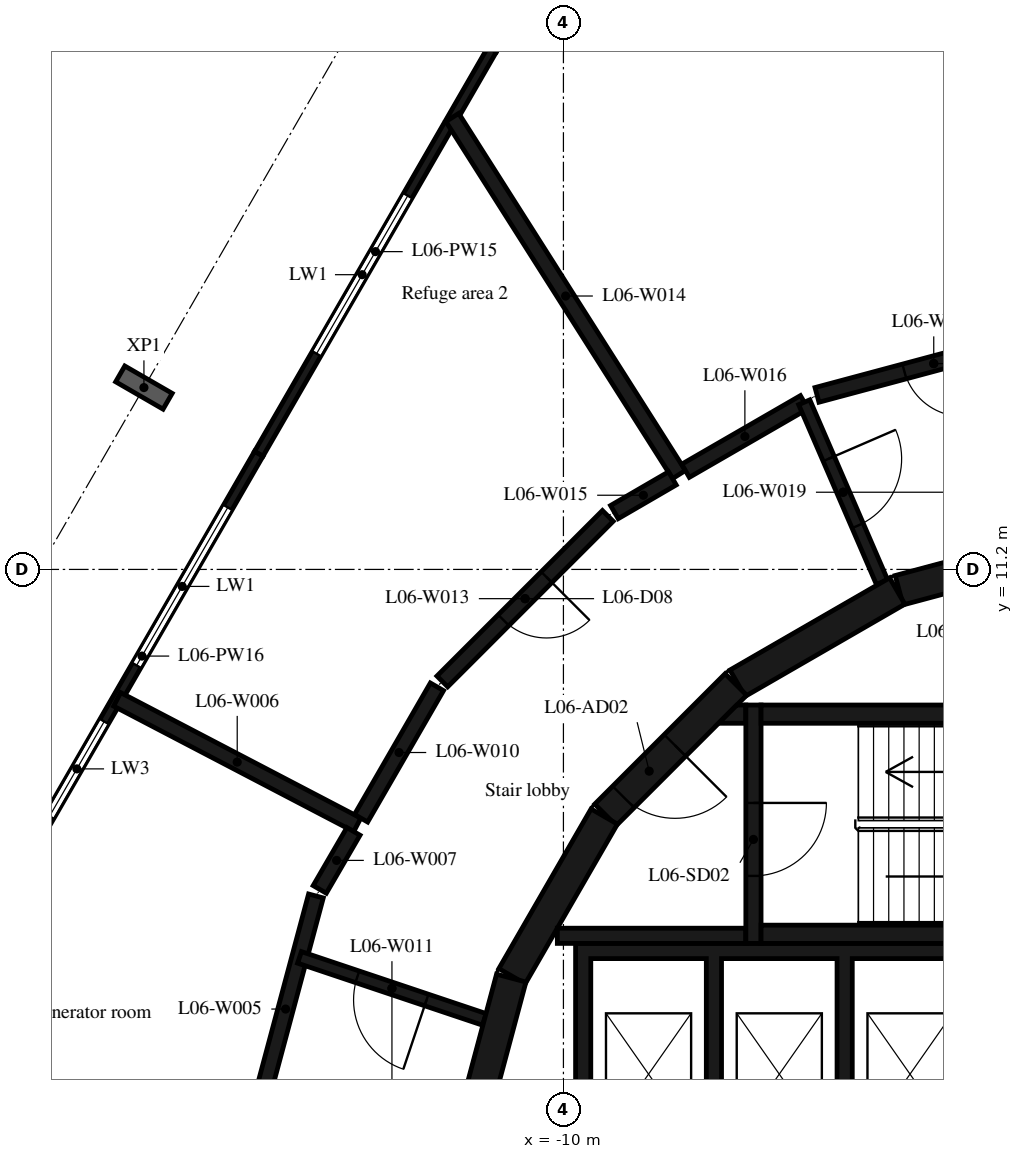
"""IFC4 building model, lengths in metres.
Left out: names, types, materials, properties, quantities, classifications, styles, units other than length and angle.
Written with IfcOpenShell. Run it as: python <this file> out.ifc"""

import sys

from ifc_helpers import new_model, si_unit, direction, frame, frame_2d, origin, origin_2d, place, context, subcontext, project, spatial, polyline, rectangle, i_section, outline, extrude, element, fill, save


model = new_model("IFC4")
c1 = context("Model", 3, precision=1e-05, world=origin(), true_north=direction((0.0, 1.0)))
c2 = subcontext(c1, "Body", "Model", "MODEL_VIEW")
j1 = project(units=[si_unit("LENGTHUNIT", "METRE"), si_unit("PLANEANGLEUNIT", "RADIAN")], contexts=[c1])
p1 = place(None, origin())
s1 = spatial("IfcSite", under=j1, at=p1, CompositionType="ELEMENT")
p2 = place(p1, origin())
s2 = spatial("IfcBuilding", under=s1, at=p2, CompositionType="ELEMENT")
p3 = place(p2, frame((0.0, 0.0, 33.0)))
s3 = spatial("IfcBuildingStorey", under=s2, at=p3, CompositionType="ELEMENT", Elevation=33.0)
p4 = place(p3, frame((-16.899, 14.19, -0.45), z_axis=(0.0, 0.0, 1.0), x_axis=(0.50000017485, 0.866025302835, 0.0)))
e1 = element("IfcColumn", 1, at=p4, inside=s3, PredefinedType="COLUMN", context=c2, shape_type="SweptSolid", body=[
    extrude(i_section(OverallWidth=0.3, OverallDepth=0.9, WebThickness=0.019, FlangeThickness=0.035, FilletRadius=0.03, at=origin_2d()), origin(), (0.0, 0.0, 1.0), 5.4),
])
p5 = place(p3, frame((-11.171, 19.752, 0.0), z_axis=(0.0, 0.0, 1.0), x_axis=(-0.500005879718, -0.866022009101, 0.0)))
e2 = element("IfcWall", 2, at=p5, inside=s3, PredefinedType="STANDARD", context=c2, shape_type="SweptSolid", body=[
    extrude(rectangle(XDim=7.68, YDim=0.16, at=frame_2d((3.84, 0.0))), origin(), (0.0, 0.0, 1.0), 4.95),
])
p6 = place(p5, frame((2.778, 0.0, 1.0)))
e3 = element("IfcOpeningElement", 3, at=p6, cuts=e2, PredefinedType="OPENING", context=c2, shape_type="SweptSolid", body=[
    extrude(rectangle(XDim=3.0, YDim=2.2, at=frame_2d((1.5, 1.1))), frame((0.0, 0.09, 0.0), z_axis=(0.0, -1.0, 0.0), x_axis=(1.0, 0.0, 0.0)), (0.0, 0.0, 1.0), 0.18),
])
p7 = place(p3, frame((-15.011, 13.101, 0.0), z_axis=(0.0, 0.0, 1.0), x_axis=(-0.500005879718, -0.866022009101, 0.0)))
e4 = element("IfcWall", 4, at=p7, inside=s3, PredefinedType="STANDARD", context=c2, shape_type="SweptSolid", body=[
    extrude(rectangle(XDim=7.68, YDim=0.16, at=frame_2d((3.84, 0.0))), origin(), (0.0, 0.0, 1.0), 4.95),
])
p8 = place(p7, frame((1.017, 0.0, 1.0)))
e5 = element("IfcOpeningElement", 5, at=p8, cuts=e4, PredefinedType="OPENING", context=c2, shape_type="SweptSolid", body=[
    extrude(rectangle(XDim=3.0, YDim=2.2, at=frame_2d((1.5, 1.1))), frame((0.0, 0.09, 0.0), z_axis=(0.0, -1.0, 0.0), x_axis=(1.0, 0.0, 0.0)), (0.0, 0.0, 1.0), 0.18),
])
p9 = place(p7, frame((5.082, 0.0, 1.0)))
e6 = element("IfcOpeningElement", 6, at=p9, cuts=e4, PredefinedType="OPENING", context=c2, shape_type="SweptSolid", body=[
    extrude(rectangle(XDim=1.8, YDim=2.2, at=frame_2d((0.9, 1.1))), frame((0.0, 0.09, 0.0), z_axis=(0.0, -1.0, 0.0), x_axis=(1.0, 0.0, 0.0)), (0.0, 0.0, 1.0), 0.18),
])
for number, where, z_axis, x_axis in (
    (7, (-1.55, 11.643, 0.0), (0.0, 0.0, 1.0), (-0.966, -0.259, 0.0)),
    (8, (-4.51, 10.845, 0.0), (0.0, 0.0, 1.0), (-0.866, -0.5, 0.0)),
):
    element("IfcWall", number, at=place(p3, frame(where, z_axis=z_axis, x_axis=x_axis)), inside=s3, PredefinedType="SHEAR", context=c2, shape_type="SweptSolid", body=[
        extrude(rectangle(XDim=3.033, YDim=0.5, at=frame_2d((1.516, 0.0))), origin(), (0.0, 0.0, 1.0), 4.95),
    ])
p10 = place(p3, frame((-7.164, 9.308, 0.0), z_axis=(0.0, 0.0, 1.0), x_axis=(-0.707106781187, -0.707106781187, 0.0)))
e9 = element("IfcWall", 9, at=p10, inside=s3, PredefinedType="SHEAR", context=c2, shape_type="SweptSolid", body=[
    extrude(rectangle(XDim=3.032, YDim=0.5, at=frame_2d((1.516, 0.0))), origin(), (0.0, 0.0, 1.0), 4.95),
])
p11 = place(p10, frame((1.416, 0.0, 0.0)))
e10 = element("IfcOpeningElement", 10, at=p11, cuts=e9, PredefinedType="OPENING", context=c2, shape_type="SweptSolid", body=[
    extrude(rectangle(XDim=1.2, YDim=2.1, at=frame_2d((0.6, 1.05))), frame((0.0, 0.26, 0.0), z_axis=(0.0, -1.0, 0.0), x_axis=(1.0, 0.0, 0.0)), (0.0, 0.0, 1.0), 0.52),
])
for number, where, z_axis, x_axis in (
    (11, (-9.329, 7.137, 0.0), (0.0, 0.0, 1.0), (-0.5, -0.866, 0.0)),
    (12, (-10.858, 4.479, 0.0), (0.0, 0.0, 1.0), (-0.259, -0.966, 0.0)),
):
    element("IfcWall", number, at=place(p3, frame(where, z_axis=z_axis, x_axis=x_axis)), inside=s3, PredefinedType="SHEAR", context=c2, shape_type="SweptSolid", body=[
        extrude(rectangle(XDim=3.033, YDim=0.5, at=frame_2d((1.516, 0.0))), origin(), (0.0, 0.0, 1.0), 4.95),
    ])
for number, where, z_axis, x_axis in (
    (13, (-6.75, 5.2, 0.0), (0.0, 0.0, 1.0), (1.0, 0.0, 0.0)),
    (14, (-6.75, 8.82, 0.0), (0.0, 0.0, 1.0), (1.0, 0.0, 0.0)),
):
    element("IfcWall", number, at=place(p3, frame(where, z_axis=z_axis, x_axis=x_axis)), inside=s3, PredefinedType="SHEAR", context=c2, shape_type="SweptSolid", body=[
        extrude(rectangle(XDim=6.75, YDim=0.3, at=frame_2d((3.375, 0.0))), origin(), (0.0, 0.0, 1.0), 4.95),
    ])
p12 = place(p3, frame((-6.875, 8.97, 0.0), z_axis=(0.0, 0.0, 1.0), x_axis=(0.0, -1.0, 0.0)))
e15 = element("IfcWall", 15, at=p12, inside=s3, PredefinedType="SHEAR", context=c2, shape_type="SweptSolid", body=[
    extrude(rectangle(XDim=3.92, YDim=0.25, at=frame_2d((1.96, 0.0))), origin(), (0.0, 0.0, 1.0), 4.95),
])
p13 = place(p12, frame((1.61, 0.0, 0.0)))
e16 = element("IfcOpeningElement", 16, at=p13, cuts=e15, PredefinedType="OPENING", context=c2, shape_type="SweptSolid", body=[
    extrude(rectangle(XDim=1.2, YDim=2.1, at=frame_2d((0.6, 1.05))), frame((0.0, 0.135, 0.0), z_axis=(0.0, -1.0, 0.0), x_axis=(1.0, 0.0, 0.0)), (0.0, 0.0, 1.0), 0.27),
])
p14 = place(p3, frame((-7.0, 5.175, 0.0), z_axis=(0.0, 0.0, 1.0), x_axis=(-1.0, 0.0, 0.0)))
e17 = element("IfcWall", 17, at=p14, inside=s3, PredefinedType="SHEAR", context=c2, shape_type="SweptSolid", body=[
    extrude(rectangle(XDim=3.1, YDim=0.25, at=frame_2d((1.55, 0.0))), origin(), (0.0, 0.0, 1.0), 4.95),
])
p15 = place(p3, origin())
e18 = element("IfcWall", 18, at=p15, inside=s3, PredefinedType="SHEAR", context=c2, shape_type="SweptSolid", body=[
    extrude(outline(polyline([(-7.148, 8.97), (-7.0, 8.97), (-7.0, 8.67), (-7.448, 8.67), (-7.148, 8.97)])), origin(), (0.0, 0.0, 1.0), 4.95),
])
p16 = place(p3, origin())
e19 = element("IfcWall", 19, at=p16, inside=s3, PredefinedType="SHEAR", context=c2, shape_type="SweptSolid", body=[
    extrude(outline(polyline([(-9.55, 4.8), (-7.65, 4.8), (-7.65, 1.9), (-7.4, 1.9), (-7.4, 4.8), (-5.5, 4.8), (-5.5, 1.9), (-5.25, 1.9), (-5.25, 4.8), (-3.35, 4.8), (-3.35, 1.9), (-3.1, 1.9), (-3.1, 4.8), (-1.2, 4.8), (-1.2, 1.9), (-0.95, 1.9), (-0.95, 4.8), (3.1, 4.8), (3.1, 1.9), (3.35, 1.9), (3.35, 4.8), (5.25, 4.8), (5.25, 1.9), (5.5, 1.9), (5.5, 4.8), (7.4, 4.8), (7.4, 1.9), (7.65, 1.9), (7.65, 4.8), (9.55, 4.8), (9.55, 1.9), (9.8, 1.9), (9.8, 4.8), (9.8, 5.05), (-9.8, 5.05), (-9.8, 4.8), (-9.8, 1.9), (-9.55, 1.9), (-9.55, 4.8)])), origin(), (0.0, 0.0, 1.0), 4.95),
])
p17 = place(p3, frame((-14.07, 5.83, 0.0), z_axis=(0.0, 0.0, 1.0), x_axis=(-0.259059323171, -0.965861411942, 0.0)))
e20 = element("IfcWall", 20, at=p17, inside=s3, PredefinedType="PARTITIONING", context=c2, shape_type="SweptSolid", body=[
    extrude(rectangle(XDim=3.851, YDim=0.25, at=frame_2d((1.925, 0.0))), origin(), (0.0, 0.0, 1.0), 4.95),
])
p18 = place(p3, frame((-13.39, 7.0, 0.0), z_axis=(0.0, 0.0, 1.0), x_axis=(-0.886352204499, 0.46301163007, 0.0)))
e21 = element("IfcWall", 21, at=p18, inside=s3, PredefinedType="PARTITIONING", context=c2, shape_type="SweptSolid", body=[
    extrude(rectangle(XDim=4.456, YDim=0.25, at=frame_2d((2.228, 0.0))), origin(), (0.0, 0.0, 1.0), 4.95),
])
p19 = place(p3, frame((-13.453, 6.892, 0.0), z_axis=(0.0, 0.0, 1.0), x_axis=(-0.502370413152, -0.864652512857, 0.0)))
e22 = element("IfcWall", 22, at=p19, inside=s3, PredefinedType="PARTITIONING", context=c2, shape_type="SweptSolid", body=[
    extrude(rectangle(XDim=1.103, YDim=0.25, at=frame_2d((0.552, 0.0))), origin(), (0.0, 0.0, 1.0), 4.95),
])
p20 = place(p3, frame((-12.08, 9.27, 0.0), z_axis=(0.0, 0.0, 1.0), x_axis=(-0.499821239653, -0.866128586522, 0.0)))
e23 = element("IfcWall", 23, at=p20, inside=s3, PredefinedType="PARTITIONING", context=c2, shape_type="SweptSolid", body=[
    extrude(rectangle(XDim=2.496, YDim=0.25, at=frame_2d((1.248, 0.0))), origin(), (0.0, 0.0, 1.0), 4.95),
])
p21 = place(p3, frame((-11.3, 3.8, 0.0), z_axis=(0.0, 0.0, 1.0), x_axis=(-0.94805712629, 0.318100118345, 0.0)))
e24 = element("IfcWall", 24, at=p21, inside=s3, PredefinedType="PARTITIONING", context=c2, shape_type="SweptSolid", body=[
    extrude(rectangle(XDim=3.207, YDim=0.2, at=frame_2d((1.603, 0.0))), origin(), (0.0, 0.0, 1.0), 4.95),
])
p22 = place(p21, frame((1.003, 0.0, 0.0)))
e25 = element("IfcOpeningElement", 25, at=p22, cuts=e24, PredefinedType="OPENING", context=c2, shape_type="SweptSolid", body=[
    extrude(rectangle(XDim=1.2, YDim=2.1, at=frame_2d((0.6, 1.05))), frame((0.0, 0.11, 0.0), z_axis=(0.0, -1.0, 0.0), x_axis=(1.0, 0.0, 0.0)), (0.0, 0.0, 1.0), 0.22),
])
p23 = place(p3, frame((-9.27, 12.08, 0.0), z_axis=(0.0, 0.0, 1.0), x_axis=(-0.707106781187, -0.707106781187, 0.0)))
e26 = element("IfcWall", 26, at=p23, inside=s3, PredefinedType="PARTITIONING", context=c2, shape_type="SweptSolid", body=[
    extrude(rectangle(XDim=3.849, YDim=0.25, at=frame_2d((1.925, 0.0))), origin(), (0.0, 0.0, 1.0), 4.95),
])
p24 = place(p23, frame((1.425, 0.0, 0.0)))
e27 = element("IfcOpeningElement", 27, at=p24, cuts=e26, PredefinedType="OPENING", context=c2, shape_type="SweptSolid", body=[
    extrude(rectangle(XDim=1.0, YDim=2.1, at=frame_2d((0.5, 1.05))), frame((0.0, 0.135, 0.0), z_axis=(0.0, -1.0, 0.0), x_axis=(1.0, 0.0, 0.0)), (0.0, 0.0, 1.0), 0.27),
])
p25 = place(p3, frame((-8.1, 12.76, 0.0), z_axis=(0.0, 0.0, 1.0), x_axis=(-0.535848500159, 0.844314150585, 0.0)))
e28 = element("IfcWall", 28, at=p25, inside=s3, PredefinedType="PARTITIONING", context=c2, shape_type="SweptSolid", body=[
    extrude(rectangle(XDim=6.955, YDim=0.25, at=frame_2d((3.478, 0.0))), origin(), (0.0, 0.0, 1.0), 4.95),
])
p26 = place(p3, frame((-8.208, 12.697, 0.0), z_axis=(0.0, 0.0, 1.0), x_axis=(-0.86455637663, -0.502535841138, 0.0)))
e29 = element("IfcWall", 29, at=p26, inside=s3, PredefinedType="PARTITIONING", context=c2, shape_type="SweptSolid", body=[
    extrude(rectangle(XDim=1.103, YDim=0.25, at=frame_2d((0.552, 0.0))), origin(), (0.0, 0.0, 1.0), 4.95),
])
p27 = place(p3, frame((-7.992, 12.823, 0.0), z_axis=(0.0, 0.0, 1.0), x_axis=(0.865900522319, 0.500216238688, 0.0)))
e30 = element("IfcWall", 30, at=p27, inside=s3, PredefinedType="PARTITIONING", context=c2, shape_type="SweptSolid", body=[
    extrude(rectangle(XDim=2.254, YDim=0.25, at=frame_2d((1.127, 0.0))), origin(), (0.0, 0.0, 1.0), 4.95),
])
p28 = place(p3, frame((-6.04, 13.949, 0.0), z_axis=(0.0, 0.0, 1.0), x_axis=(0.396905977672, -0.917859272922, 0.0)))
e31 = element("IfcWall", 31, at=p28, inside=s3, PredefinedType="PARTITIONING", context=c2, shape_type="SweptSolid", body=[
    extrude(rectangle(XDim=3.224, YDim=0.2, at=frame_2d((1.612, 0.0))), origin(), (0.0, 0.0, 1.0), 4.95),
])
p29 = place(p28, frame((1.012, 0.0, 0.0)))
e32 = element("IfcOpeningElement", 32, at=p29, cuts=e31, PredefinedType="OPENING", context=c2, shape_type="SweptSolid", body=[
    extrude(rectangle(XDim=1.2, YDim=2.1, at=frame_2d((0.6, 1.05))), frame((0.0, 0.11, 0.0), z_axis=(0.0, -1.0, 0.0), x_axis=(1.0, 0.0, 0.0)), (0.0, 0.0, 1.0), 0.22),
])
p30 = place(p3, frame((-1.99, 15.1, 0.0), z_axis=(0.0, 0.0, 1.0), x_axis=(-0.965857829358, -0.259072679895, 0.0)))
e33 = element("IfcWall", 33, at=p30, inside=s3, PredefinedType="PARTITIONING", context=c2, shape_type="SweptSolid", body=[
    extrude(rectangle(XDim=3.976, YDim=0.25, at=frame_2d((1.988, 0.0))), origin(), (0.0, 0.0, 1.0), 4.95),
])
p31 = place(p30, frame((1.488, 0.0, 0.0)))
e34 = element("IfcOpeningElement", 34, at=p31, cuts=e33, PredefinedType="OPENING", context=c2, shape_type="SweptSolid", body=[
    extrude(rectangle(XDim=1.0, YDim=2.1, at=frame_2d((0.5, 1.05))), frame((0.0, 0.135, 0.0), z_axis=(0.0, -1.0, 0.0), x_axis=(1.0, 0.0, 0.0)), (0.0, 0.0, 1.0), 0.27),
])
p32 = place(p6, origin())
e35 = element("IfcWindow", 35, at=p32, inside=s3, PartitioningType="SINGLE_PANEL", PredefinedType="WINDOW", context=c2, shape_type="SweptSolid", body=[
    extrude(rectangle(XDim=3.0, YDim=2.2, at=frame_2d((1.5, 1.1))), frame((0.0, 0.03, 0.0), z_axis=(0.0, -1.0, 0.0), x_axis=(1.0, 0.0, 0.0)), (0.0, 0.0, 1.0), 0.06),
])
fill(e3, e35)
p33 = place(p8, origin())
e36 = element("IfcWindow", 36, at=p33, inside=s3, PartitioningType="SINGLE_PANEL", PredefinedType="WINDOW", context=c2, shape_type="SweptSolid", body=[
    extrude(rectangle(XDim=3.0, YDim=2.2, at=frame_2d((1.5, 1.1))), frame((0.0, 0.03, 0.0), z_axis=(0.0, -1.0, 0.0), x_axis=(1.0, 0.0, 0.0)), (0.0, 0.0, 1.0), 0.06),
])
fill(e5, e36)
p34 = place(p9, origin())
e37 = element("IfcWindow", 37, at=p34, inside=s3, PartitioningType="SINGLE_PANEL", PredefinedType="WINDOW", context=c2, shape_type="SweptSolid", body=[
    extrude(rectangle(XDim=1.8, YDim=2.2, at=frame_2d((0.9, 1.1))), frame((0.0, 0.03, 0.0), z_axis=(0.0, -1.0, 0.0), x_axis=(1.0, 0.0, 0.0)), (0.0, 0.0, 1.0), 0.06),
])
fill(e6, e37)
p35 = place(p13, origin())
e38 = element("IfcDoor", 38, at=p35, inside=s3, OperationType="SINGLE_SWING_LEFT", PredefinedType="DOOR", context=c2, shape_type="SweptSolid", body=[
    extrude(rectangle(XDim=1.2, YDim=2.1, at=frame_2d((0.6, 1.05))), frame((0.0, 0.025, 0.0), z_axis=(0.0, -1.0, 0.0), x_axis=(1.0, 0.0, 0.0)), (0.0, 0.0, 1.0), 0.05),
])
fill(e16, e38)
p36 = place(p11, origin())
e39 = element("IfcDoor", 39, at=p36, inside=s3, OperationType="SINGLE_SWING_RIGHT", PredefinedType="DOOR", context=c2, shape_type="SweptSolid", body=[
    extrude(rectangle(XDim=1.2, YDim=2.1, at=frame_2d((0.6, 1.05))), frame((0.0, 0.025, 0.0), z_axis=(0.0, -1.0, 0.0), x_axis=(1.0, 0.0, 0.0)), (0.0, 0.0, 1.0), 0.05),
])
fill(e10, e39)
p37 = place(p24, origin())
e40 = element("IfcDoor", 40, at=p37, inside=s3, OperationType="SINGLE_SWING_LEFT", PredefinedType="DOOR", context=c2, shape_type="SweptSolid", body=[
    extrude(rectangle(XDim=1.0, YDim=2.1, at=frame_2d((0.5, 1.05))), frame((0.0, 0.025, 0.0), z_axis=(0.0, -1.0, 0.0), x_axis=(1.0, 0.0, 0.0)), (0.0, 0.0, 1.0), 0.05),
])
fill(e27, e40)
p38 = place(p31, origin())
e41 = element("IfcDoor", 41, at=p38, inside=s3, OperationType="SINGLE_SWING_LEFT", PredefinedType="DOOR", context=c2, shape_type="SweptSolid", body=[
    extrude(rectangle(XDim=1.0, YDim=2.1, at=frame_2d((0.5, 1.05))), frame((0.0, 0.025, 0.0), z_axis=(0.0, -1.0, 0.0), x_axis=(1.0, 0.0, 0.0)), (0.0, 0.0, 1.0), 0.05),
])
fill(e34, e41)
p39 = place(p29, origin())
e42 = element("IfcDoor", 42, at=p39, inside=s3, OperationType="SINGLE_SWING_LEFT", PredefinedType="DOOR", context=c2, shape_type="SweptSolid", body=[
    extrude(rectangle(XDim=1.2, YDim=2.1, at=frame_2d((0.6, 1.05))), frame((0.0, 0.025, 0.0), z_axis=(0.0, -1.0, 0.0), x_axis=(1.0, 0.0, 0.0)), (0.0, 0.0, 1.0), 0.05),
])
fill(e32, e42)
p40 = place(p22, origin())
e43 = element("IfcDoor", 43, at=p40, inside=s3, OperationType="SINGLE_SWING_LEFT", PredefinedType="DOOR", context=c2, shape_type="SweptSolid", body=[
    extrude(rectangle(XDim=1.2, YDim=2.1, at=frame_2d((0.6, 1.05))), frame((0.0, 0.025, 0.0), z_axis=(0.0, -1.0, 0.0), x_axis=(1.0, 0.0, 0.0)), (0.0, 0.0, 1.0), 0.05),
])
fill(e25, e43)
save(model, sys.argv[1])
